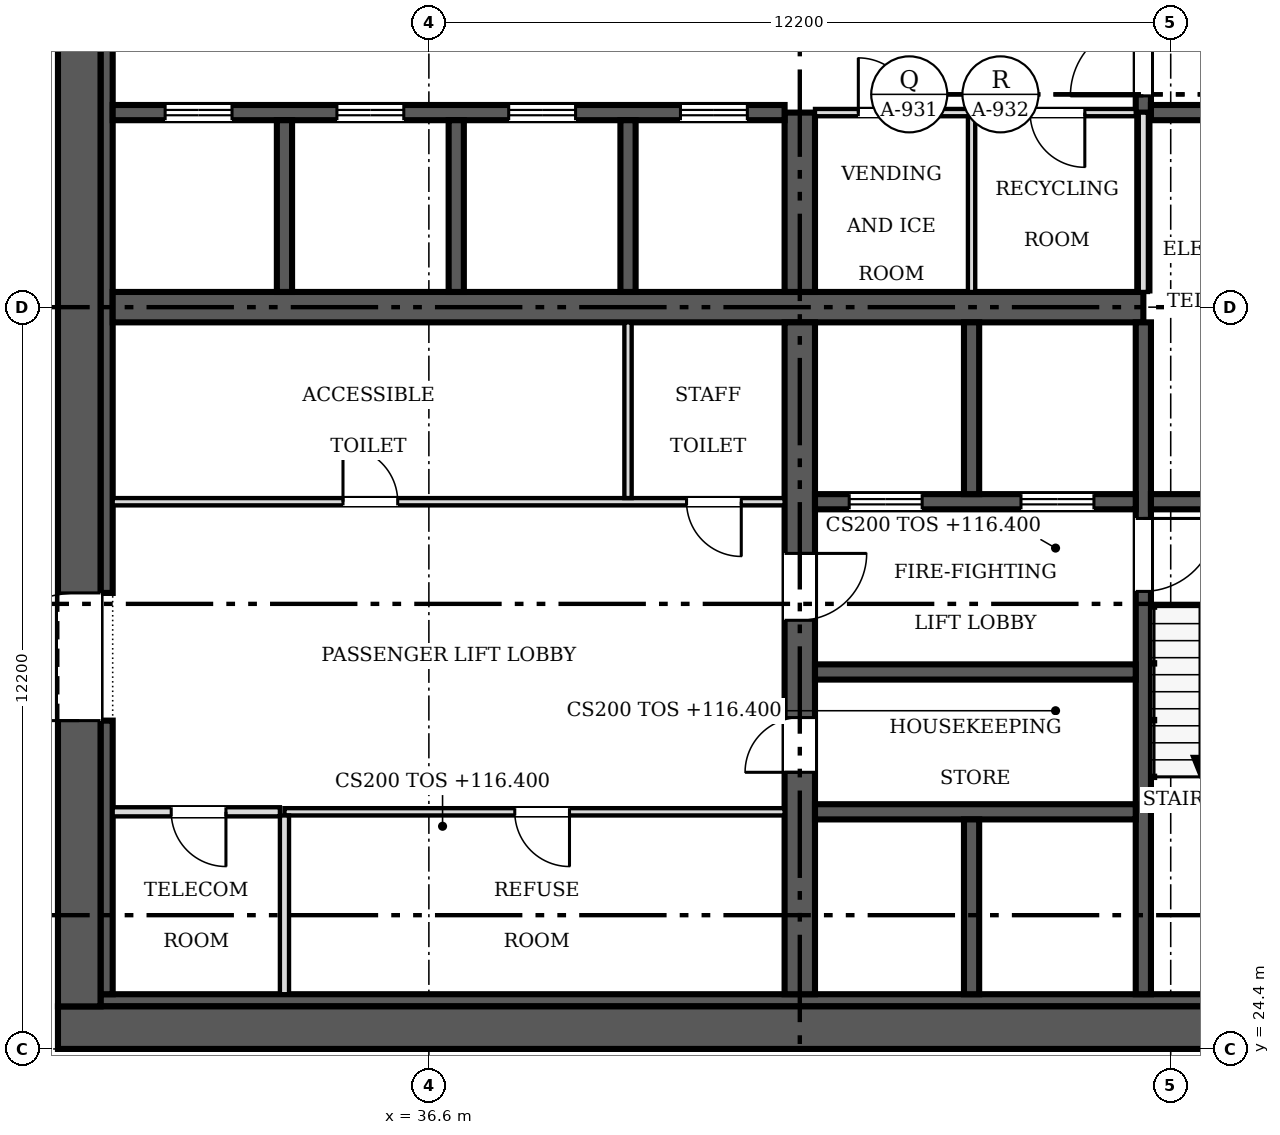
"""IFC4 building model, lengths in metres.
Left out: names, types, materials, properties, quantities, classifications, styles, units other than length and angle.
Written with IfcOpenShell. Run it as: python <this file> out.ifc"""

import sys

from ifc_helpers import new_model, si_unit, direction, frame, frame_2d, origin, place, context, subcontext, project, spatial, rectangle, extrude, source, transform, mapped, element, fill, save


model = new_model("IFC4")
c1 = context("Model", 3, precision=1e-05, world=origin(), true_north=direction((0.0, 1.0)))
c2 = subcontext(c1, "Body", "Model", "MODEL_VIEW")
j1 = project(units=[si_unit("LENGTHUNIT", "METRE"), si_unit("PLANEANGLEUNIT", "RADIAN")], contexts=[c1])
p1 = place(None, origin())
s1 = spatial("IfcSite", under=j1, at=p1, CompositionType="ELEMENT")
p2 = place(p1, origin())
s2 = spatial("IfcBuilding", under=s1, at=p2, CompositionType="ELEMENT")
p3 = place(p2, frame((0.0, 0.0, 116.4)))
s3 = spatial("IfcBuildingStorey", under=s2, at=p3, CompositionType="ELEMENT", Elevation=116.4)
p4 = place(p3, frame((54.9, 24.75, 0.0), z_axis=(0.0, 0.0, 1.0), x_axis=(-1.0, 0.0, 0.0)))
e1 = element("IfcWall", 1, at=p4, inside=s3, PredefinedType="SHEAR", context=c2, shape_type="SweptSolid", body=[
    extrude(rectangle(XDim=24.4, YDim=0.7, at=frame_2d((12.2, 0.0))), origin(), (0.0, 0.0, 1.0), 3.8),
])
m1 = source(origin(), c2, "Body", "SweptSolid", [
    extrude(rectangle(XDim=1.2, YDim=2.1, at=frame_2d((0.6, 1.05))), frame((0.0, 0.36, 0.0), z_axis=(0.0, -1.0, 0.0), x_axis=(1.0, 0.0, 0.0)), (0.0, 0.0, 1.0), 0.72),
])
p5 = place(p4, frame((1.5, 0.0, 0.0)))
e2 = element("IfcOpeningElement", 2, at=p5, cuts=e1, PredefinedType="OPENING", context=c2, shape_type="MappedRepresentation", body=[
    mapped(m1, transform((0.0, 0.0, 0.0), scale=1.0)),
])
p6 = place(p3, frame((30.85, 25.1, 0.0), z_axis=(0.0, 0.0, 1.0), x_axis=(0.0, 1.0, 0.0)))
e3 = element("IfcWall", 3, at=p6, inside=s3, PredefinedType="SHEAR", context=c2, shape_type="SweptSolid", body=[
    extrude(rectangle(XDim=23.0, YDim=0.7, at=frame_2d((11.5, 0.0))), origin(), (0.0, 0.0, 1.0), 3.8),
])
m2 = source(origin(), c2, "Body", "SweptSolid", [
    extrude(rectangle(XDim=2.1, YDim=2.4, at=frame_2d((1.05, 1.2))), frame((0.0, 0.36, 0.0), z_axis=(0.0, -1.0, 0.0), x_axis=(1.0, 0.0, 0.0)), (0.0, 0.0, 1.0), 0.72),
])
p7 = place(p6, frame((4.7, 0.0, 0.0)))
e4 = element("IfcOpeningElement", 4, at=p7, cuts=e3, PredefinedType="OPENING", context=c2, shape_type="MappedRepresentation", body=[
    mapped(m2, transform((0.0, 0.0, 0.0), scale=1.0)),
])
p8 = place(p6, frame((16.2, 0.0, 0.0)))
e5 = element("IfcOpeningElement", 5, at=p8, cuts=e3, PredefinedType="OPENING", context=c2, shape_type="MappedRepresentation", body=[
    mapped(m2, transform((0.0, 0.0, 0.0), scale=1.0)),
])
p9 = place(p3, frame((31.2, 25.2, 0.0), z_axis=(0.0, 0.0, 1.0), x_axis=(1.0, 0.0, 0.0)))
e6 = element("IfcWall", 6, at=p9, inside=s3, PredefinedType="SOLIDWALL", context=c2, shape_type="SweptSolid", body=[
    extrude(rectangle(XDim=21.0, YDim=0.2, at=frame_2d((10.5, 0.0))), origin(), (0.0, 0.0, 1.0), 3.8),
])
p10 = place(p3, frame((31.3, 25.3, 0.0), z_axis=(0.0, 0.0, 1.0), x_axis=(0.0, 1.0, 0.0)))
e7 = element("IfcWall", 7, at=p10, inside=s3, PredefinedType="SOLIDWALL", context=c2, shape_type="SweptSolid", body=[
    extrude(rectangle(XDim=4.5, YDim=0.2, at=frame_2d((2.25, 0.0))), origin(), (0.0, 0.0, 1.0), 3.8),
])
p11 = place(p3, frame((31.3, 31.9, 0.0), z_axis=(0.0, 0.0, 1.0), x_axis=(0.0, 1.0, 0.0)))
e8 = element("IfcWall", 8, at=p11, inside=s3, PredefinedType="SOLIDWALL", context=c2, shape_type="SweptSolid", body=[
    extrude(rectangle(XDim=9.4, YDim=0.2, at=frame_2d((4.7, 0.0))), origin(), (0.0, 0.0, 1.0), 3.8),
])
p12 = place(p3, frame((31.4, 36.6, 0.0), z_axis=(0.0, 0.0, 1.0), x_axis=(1.0, 0.0, 0.0)))
e9 = element("IfcWall", 9, at=p12, inside=s3, PredefinedType="SHEAR", context=c2, shape_type="SweptSolid", body=[
    extrude(rectangle(XDim=16.95, YDim=0.5, at=frame_2d((8.475, 0.0))), origin(), (0.0, 0.0, 1.0), 3.8),
])
p13 = place(p3, frame((42.7, 36.35, 0.0), z_axis=(0.0, 0.0, 1.0), x_axis=(0.0, -1.0, 0.0)))
e10 = element("IfcWall", 10, at=p13, inside=s3, PredefinedType="SHEAR", context=c2, shape_type="SweptSolid", body=[
    extrude(rectangle(XDim=11.05, YDim=0.5, at=frame_2d((5.525, 0.0))), origin(), (0.0, 0.0, 1.0), 3.8),
])
m3 = source(origin(), c2, "Body", "SweptSolid", [
    extrude(rectangle(XDim=0.9, YDim=2.1, at=frame_2d((0.45, 1.05))), frame((0.0, 0.26, 0.0), z_axis=(0.0, -1.0, 0.0), x_axis=(1.0, 0.0, 0.0)), (0.0, 0.0, 1.0), 0.52),
])
p14 = place(p13, frame((6.5, 0.0, 0.0)))
e11 = element("IfcOpeningElement", 11, at=p14, cuts=e10, PredefinedType="OPENING", context=c2, shape_type="MappedRepresentation", body=[
    mapped(m3, transform((0.0, 0.0, 0.0), scale=1.0)),
])
m4 = source(origin(), c2, "Body", "SweptSolid", [
    extrude(rectangle(XDim=1.1, YDim=2.1, at=frame_2d((0.55, 1.05))), frame((0.0, 0.26, 0.0), z_axis=(0.0, -1.0, 0.0), x_axis=(1.0, 0.0, 0.0)), (0.0, 0.0, 1.0), 0.52),
])
p15 = place(p13, frame((3.8, 0.0, 0.0)))
e12 = element("IfcOpeningElement", 12, at=p15, cuts=e10, PredefinedType="OPENING", context=c2, shape_type="MappedRepresentation", body=[
    mapped(m4, transform((0.0, 0.0, 0.0), scale=1.0)),
])
p16 = place(p3, frame((42.7, 36.85, 0.0), z_axis=(0.0, 0.0, 1.0), x_axis=(0.0, 1.0, 0.0)))
e13 = element("IfcWall", 13, at=p16, inside=s3, PredefinedType="SHEAR", context=c2, shape_type="SweptSolid", body=[
    extrude(rectangle(XDim=2.95, YDim=0.5, at=frame_2d((1.475, 0.0))), origin(), (0.0, 0.0, 1.0), 3.8),
])
p17 = place(p3, frame((31.4, 39.8, 0.0), z_axis=(0.0, 0.0, 1.0), x_axis=(1.0, 0.0, 0.0)))
e14 = element("IfcWall", 14, at=p17, inside=s3, PredefinedType="SOLIDWALL", context=c2, shape_type="SweptSolid", body=[
    extrude(rectangle(XDim=11.05, YDim=0.25, at=frame_2d((5.525, 0.0))), origin(), (0.0, 0.0, 1.0), 3.8),
])
m5 = source(origin(), c2, "Body", "SweptSolid", [
    extrude(rectangle(XDim=1.1, YDim=2.1, at=frame_2d((0.55, 1.05))), frame((0.0, 0.135, 0.0), z_axis=(0.0, -1.0, 0.0), x_axis=(1.0, 0.0, 0.0)), (0.0, 0.0, 1.0), 0.27),
])
p18 = place(p17, frame((0.863, 0.0, 0.0)))
e15 = element("IfcOpeningElement", 15, at=p18, cuts=e14, PredefinedType="OPENING", context=c2, shape_type="MappedRepresentation", body=[
    mapped(m5, transform((0.0, 0.0, 0.0), scale=1.0)),
])
p19 = place(p17, frame((3.688, 0.0, 0.0)))
e16 = element("IfcOpeningElement", 16, at=p19, cuts=e14, PredefinedType="OPENING", context=c2, shape_type="MappedRepresentation", body=[
    mapped(m5, transform((0.0, 0.0, 0.0), scale=1.0)),
])
p20 = place(p17, frame((6.512, 0.0, 0.0)))
e17 = element("IfcOpeningElement", 17, at=p20, cuts=e14, PredefinedType="OPENING", context=c2, shape_type="MappedRepresentation", body=[
    mapped(m5, transform((0.0, 0.0, 0.0), scale=1.0)),
])
p21 = place(p17, frame((9.337, 0.0, 0.0)))
e18 = element("IfcOpeningElement", 18, at=p21, cuts=e14, PredefinedType="OPENING", context=c2, shape_type="MappedRepresentation", body=[
    mapped(m5, transform((0.0, 0.0, 0.0), scale=1.0)),
])
p22 = place(p3, frame((48.35, 36.35, 0.0), z_axis=(0.0, 0.0, 1.0), x_axis=(0.0, -1.0, 0.0)))
e19 = element("IfcWall", 19, at=p22, inside=s3, PredefinedType="SOLIDWALL", context=c2, shape_type="SweptSolid", body=[
    extrude(rectangle(XDim=11.05, YDim=0.25, at=frame_2d((5.525, 0.0))), origin(), (0.0, 0.0, 1.0), 3.8),
])
m6 = source(origin(), c2, "Body", "SweptSolid", [
    extrude(rectangle(XDim=1.2, YDim=2.1, at=frame_2d((0.6, 1.05))), frame((0.0, 0.135, 0.0), z_axis=(0.0, -1.0, 0.0), x_axis=(1.0, 0.0, 0.0)), (0.0, 0.0, 1.0), 0.27),
])
p23 = place(p22, frame((3.225, 0.0, 0.0)))
e20 = element("IfcOpeningElement", 20, at=p23, cuts=e19, PredefinedType="OPENING", context=c2, shape_type="MappedRepresentation", body=[
    mapped(m6, transform((0.0, 0.0, 0.0), scale=1.0)),
])
p24 = place(p3, frame((48.225, 33.4, 0.0), z_axis=(0.0, 0.0, 1.0), x_axis=(-1.0, 0.0, 0.0)))
e21 = element("IfcWall", 21, at=p24, inside=s3, PredefinedType="SOLIDWALL", context=c2, shape_type="SweptSolid", body=[
    extrude(rectangle(XDim=5.275, YDim=0.25, at=frame_2d((2.638, 0.0))), origin(), (0.0, 0.0, 1.0), 3.8),
])
p25 = place(p24, frame((3.512, 0.0, 0.0)))
e22 = element("IfcOpeningElement", 22, at=p25, cuts=e21, PredefinedType="OPENING", context=c2, shape_type="MappedRepresentation", body=[
    mapped(m6, transform((0.0, 0.0, 0.0), scale=1.0)),
])
p26 = place(p24, frame((0.688, 0.0, 0.0)))
e23 = element("IfcOpeningElement", 23, at=p26, cuts=e21, PredefinedType="OPENING", context=c2, shape_type="MappedRepresentation", body=[
    mapped(m6, transform((0.0, 0.0, 0.0), scale=1.0)),
])
p27 = place(p3, frame((48.475, 33.4, 0.0), z_axis=(0.0, 0.0, 1.0), x_axis=(1.0, 0.0, 0.0)))
e24 = element("IfcWall", 24, at=p27, inside=s3, PredefinedType="SOLIDWALL", context=c2, shape_type="SweptSolid", body=[
    extrude(rectangle(XDim=3.525, YDim=0.25, at=frame_2d((1.762, 0.0))), origin(), (0.0, 0.0, 1.0), 3.8),
])
p28 = place(p3, frame((48.35, 47.9, 0.0), z_axis=(0.0, 0.0, 1.0), x_axis=(0.0, -1.0, 0.0)))
e25 = element("IfcWall", 25, at=p28, inside=s3, PredefinedType="SOLIDWALL", context=c2, shape_type="SweptSolid", body=[
    extrude(rectangle(XDim=8.1, YDim=0.25, at=frame_2d((4.05, 0.0))), origin(), (0.0, 0.0, 1.0), 3.8),
])
p29 = place(p28, frame((6.625, 0.0, 0.0)))
e26 = element("IfcOpeningElement", 26, at=p29, cuts=e25, PredefinedType="OPENING", context=c2, shape_type="MappedRepresentation", body=[
    mapped(m6, transform((0.0, 0.0, 0.0), scale=1.0)),
])
for number, where, z_axis, x_axis in (
    (27, (42.95, 28.3, 0.0), (0.0, 0.0, 1.0), (1.0, 0.0, 0.0)),
    (28, (42.95, 30.6, 0.0), (0.0, 0.0, 1.0), (1.0, 0.0, 0.0)),
):
    element("IfcWall", number, at=place(p3, frame(where, z_axis=z_axis, x_axis=x_axis)), inside=s3, PredefinedType="SOLIDWALL", context=c2, shape_type="SweptSolid", body=[
        extrude(rectangle(XDim=5.275, YDim=0.25, at=frame_2d((2.638, 0.0))), origin(), (0.0, 0.0, 1.0), 3.8),
    ])
p30 = place(p3, frame((48.475, 39.8, 0.0), z_axis=(0.0, 0.0, 1.0), x_axis=(1.0, 0.0, 0.0)))
e29 = element("IfcWall", 29, at=p30, inside=s3, PredefinedType="SOLIDWALL", context=c2, shape_type="SweptSolid", body=[
    extrude(rectangle(XDim=3.4, YDim=0.25, at=frame_2d((1.7, 0.0))), origin(), (0.0, 0.0, 1.0), 3.8),
])
for number, where, z_axis, x_axis in (
    (30, (34.225, 36.85, 0.0), (0.0, 0.0, 1.0), (0.0, 1.0, 0.0)),
    (31, (37.05, 36.85, 0.0), (0.0, 0.0, 1.0), (0.0, 1.0, 0.0)),
    (32, (39.875, 36.85, 0.0), (0.0, 0.0, 1.0), (0.0, 1.0, 0.0)),
):
    element("IfcWall", number, at=place(p3, frame(where, z_axis=z_axis, x_axis=x_axis)), inside=s3, PredefinedType="SOLIDWALL", context=c2, shape_type="SweptSolid", body=[
        extrude(rectangle(XDim=2.825, YDim=0.25, at=frame_2d((1.413, 0.0))), origin(), (0.0, 0.0, 1.0), 3.8),
    ])
p31 = place(p3, frame((45.525, 33.525, 0.0), z_axis=(0.0, 0.0, 1.0), x_axis=(0.0, 1.0, 0.0)))
e33 = element("IfcWall", 33, at=p31, inside=s3, PredefinedType="SOLIDWALL", context=c2, shape_type="SweptSolid", body=[
    extrude(rectangle(XDim=2.825, YDim=0.25, at=frame_2d((1.413, 0.0))), origin(), (0.0, 0.0, 1.0), 3.8),
])
p32 = place(p3, frame((45.525, 25.3, 0.0), z_axis=(0.0, 0.0, 1.0), x_axis=(0.0, 1.0, 0.0)))
e34 = element("IfcWall", 34, at=p32, inside=s3, PredefinedType="SOLIDWALL", context=c2, shape_type="SweptSolid", body=[
    extrude(rectangle(XDim=2.875, YDim=0.25, at=frame_2d((1.438, 0.0))), origin(), (0.0, 0.0, 1.0), 3.8),
])
p33 = place(p3, frame((31.4, 33.4, 0.0), z_axis=(0.0, 0.0, 1.0), x_axis=(1.0, 0.0, 0.0)))
e35 = element("IfcWall", 35, at=p33, inside=s3, PredefinedType="PARTITIONING", context=c2, shape_type="SweptSolid", body=[
    extrude(rectangle(XDim=11.05, YDim=0.12, at=frame_2d((5.525, 0.0))), origin(), (0.0, 0.0, 1.0), 3.6),
])
m7 = source(origin(), c2, "Body", "SweptSolid", [
    extrude(rectangle(XDim=0.9, YDim=2.1, at=frame_2d((0.45, 1.05))), frame((0.0, 0.07, 0.0), z_axis=(0.0, -1.0, 0.0), x_axis=(1.0, 0.0, 0.0)), (0.0, 0.0, 1.0), 0.14),
])
p34 = place(p33, frame((3.788, 0.0, 0.0)))
e36 = element("IfcOpeningElement", 36, at=p34, cuts=e35, PredefinedType="OPENING", context=c2, shape_type="MappedRepresentation", body=[
    mapped(m7, transform((0.0, 0.0, 0.0), scale=1.0)),
])
p35 = place(p33, frame((9.438, 0.0, 0.0)))
e37 = element("IfcOpeningElement", 37, at=p35, cuts=e35, PredefinedType="OPENING", context=c2, shape_type="MappedRepresentation", body=[
    mapped(m7, transform((0.0, 0.0, 0.0), scale=1.0)),
])
p36 = place(p3, frame((42.45, 28.3, 0.0), z_axis=(0.0, 0.0, 1.0), x_axis=(-1.0, 0.0, 0.0)))
e38 = element("IfcWall", 38, at=p36, inside=s3, PredefinedType="PARTITIONING", context=c2, shape_type="SweptSolid", body=[
    extrude(rectangle(XDim=8.225, YDim=0.12, at=frame_2d((4.112, 0.0))), origin(), (0.0, 0.0, 1.0), 3.6),
])
p37 = place(p36, frame((3.538, 0.0, 0.0)))
e39 = element("IfcOpeningElement", 39, at=p37, cuts=e38, PredefinedType="OPENING", context=c2, shape_type="MappedRepresentation", body=[
    mapped(m7, transform((0.0, 0.0, 0.0), scale=1.0)),
])
p38 = place(p3, frame((48.225, 39.8, 0.0), z_axis=(0.0, 0.0, 1.0), x_axis=(-1.0, 0.0, 0.0)))
e40 = element("IfcWall", 40, at=p38, inside=s3, PredefinedType="PARTITIONING", context=c2, shape_type="SweptSolid", body=[
    extrude(rectangle(XDim=5.275, YDim=0.12, at=frame_2d((2.638, 0.0))), origin(), (0.0, 0.0, 1.0), 3.6),
])
p39 = place(p38, frame((3.663, 0.0, 0.0)))
e41 = element("IfcOpeningElement", 41, at=p39, cuts=e40, PredefinedType="OPENING", context=c2, shape_type="MappedRepresentation", body=[
    mapped(m7, transform((0.0, 0.0, 0.0), scale=1.0)),
])
p40 = place(p38, frame((0.837, 0.0, 0.0)))
e42 = element("IfcOpeningElement", 42, at=p40, cuts=e40, PredefinedType="OPENING", context=c2, shape_type="MappedRepresentation", body=[
    mapped(m7, transform((0.0, 0.0, 0.0), scale=1.0)),
])
p41 = place(p3, frame((45.525, 36.85, 0.0), z_axis=(0.0, 0.0, 1.0), x_axis=(0.0, 1.0, 0.0)))
e43 = element("IfcWall", 43, at=p41, inside=s3, PredefinedType="PARTITIONING", context=c2, shape_type="SweptSolid", body=[
    extrude(rectangle(XDim=2.89, YDim=0.12, at=frame_2d((1.445, 0.0))), origin(), (0.0, 0.0, 1.0), 3.6),
])
p42 = place(p3, frame((48.35, 36.85, 0.0), z_axis=(0.0, 0.0, 1.0), x_axis=(0.0, 1.0, 0.0)))
e44 = element("IfcWall", 44, at=p42, inside=s3, PredefinedType="PARTITIONING", context=c2, shape_type="SweptSolid", body=[
    extrude(rectangle(XDim=2.95, YDim=0.15, at=frame_2d((1.475, 0.0))), origin(), (0.0, 0.0, 1.0), 3.6),
])
p43 = place(p3, frame((39.875, 33.46, 0.0), z_axis=(0.0, 0.0, 1.0), x_axis=(0.0, 1.0, 0.0)))
e45 = element("IfcWall", 45, at=p43, inside=s3, PredefinedType="PARTITIONING", context=c2, shape_type="SweptSolid", body=[
    extrude(rectangle(XDim=2.89, YDim=0.12, at=frame_2d((1.445, 0.0))), origin(), (0.0, 0.0, 1.0), 3.6),
])
p44 = place(p3, frame((34.225, 25.3, 0.0), z_axis=(0.0, 0.0, 1.0), x_axis=(0.0, 1.0, 0.0)))
e46 = element("IfcWall", 46, at=p44, inside=s3, PredefinedType="PARTITIONING", context=c2, shape_type="SweptSolid", body=[
    extrude(rectangle(XDim=2.94, YDim=0.15, at=frame_2d((1.47, 0.0))), origin(), (0.0, 0.0, 1.0), 3.6),
])
p45 = place(p3, frame((34.15, 28.3, 0.0), z_axis=(0.0, 0.0, 1.0), x_axis=(-1.0, 0.0, 0.0)))
e47 = element("IfcWall", 47, at=p45, inside=s3, PredefinedType="PARTITIONING", context=c2, shape_type="SweptSolid", body=[
    extrude(rectangle(XDim=2.75, YDim=0.15, at=frame_2d((1.375, 0.0))), origin(), (0.0, 0.0, 1.0), 3.6),
])
m8 = source(origin(), c2, "Body", "SweptSolid", [
    extrude(rectangle(XDim=0.9, YDim=2.1, at=frame_2d((0.45, 1.05))), frame((0.0, 0.085, 0.0), z_axis=(0.0, -1.0, 0.0), x_axis=(1.0, 0.0, 0.0)), (0.0, 0.0, 1.0), 0.17),
])
p46 = place(p45, frame((0.887, 0.0, 0.0)))
e48 = element("IfcOpeningElement", 48, at=p46, cuts=e47, PredefinedType="OPENING", context=c2, shape_type="MappedRepresentation", body=[
    mapped(m8, transform((0.0, 0.0, 0.0), scale=1.0)),
])
m9 = source(origin(), c2, "Body", "SweptSolid", [
    extrude(rectangle(XDim=2.1, YDim=2.4, at=frame_2d((1.05, 1.2))), frame((0.0, 0.025, 0.0), z_axis=(0.0, -1.0, 0.0), x_axis=(1.0, 0.0, 0.0)), (0.0, 0.0, 1.0), 0.05),
])
p47 = place(p7, origin())
e49 = element("IfcDoor", 49, at=p47, inside=s3, OperationType="DOUBLE_DOOR_SINGLE_SWING", PredefinedType="DOOR", context=c2, shape_type="MappedRepresentation", body=[
    mapped(m9, transform((0.0, 0.0, 0.0), scale=1.0)),
])
fill(e4, e49)
m10 = source(origin(), c2, "Body", "SweptSolid", [
    extrude(rectangle(XDim=0.9, YDim=2.1, at=frame_2d((0.45, 1.05))), frame((0.0, 0.025, 0.0), z_axis=(0.0, -1.0, 0.0), x_axis=(1.0, 0.0, 0.0)), (0.0, 0.0, 1.0), 0.05),
])
p48 = place(p14, origin())
e50 = element("IfcDoor", 50, at=p48, inside=s3, OperationType="SINGLE_SWING_RIGHT", PredefinedType="DOOR", context=c2, shape_type="MappedRepresentation", body=[
    mapped(m10, transform((0.0, 0.0, 0.0), scale=1.0)),
])
fill(e11, e50)
m11 = source(origin(), c2, "Body", "SweptSolid", [
    extrude(rectangle(XDim=1.1, YDim=2.1, at=frame_2d((0.55, 1.05))), frame((0.0, 0.025, 0.0), z_axis=(0.0, -1.0, 0.0), x_axis=(1.0, 0.0, 0.0)), (0.0, 0.0, 1.0), 0.05),
])
p49 = place(p15, origin())
e51 = element("IfcDoor", 51, at=p49, inside=s3, OperationType="SINGLE_SWING_LEFT", PredefinedType="DOOR", context=c2, shape_type="MappedRepresentation", body=[
    mapped(m11, transform((0.0, 0.0, 0.0), scale=1.0)),
])
fill(e12, e51)
p50 = place(p18, origin())
e52 = element("IfcDoor", 52, at=p50, inside=s3, OperationType="DOUBLE_DOOR_SLIDING", PredefinedType="DOOR", context=c2, shape_type="MappedRepresentation", body=[
    mapped(m11, transform((0.0, 0.0, 0.0), scale=1.0)),
])
fill(e15, e52)
p51 = place(p19, origin())
e53 = element("IfcDoor", 53, at=p51, inside=s3, OperationType="DOUBLE_DOOR_SLIDING", PredefinedType="DOOR", context=c2, shape_type="MappedRepresentation", body=[
    mapped(m11, transform((0.0, 0.0, 0.0), scale=1.0)),
])
fill(e16, e53)
p52 = place(p20, origin())
e54 = element("IfcDoor", 54, at=p52, inside=s3, OperationType="DOUBLE_DOOR_SLIDING", PredefinedType="DOOR", context=c2, shape_type="MappedRepresentation", body=[
    mapped(m11, transform((0.0, 0.0, 0.0), scale=1.0)),
])
fill(e17, e54)
p53 = place(p21, origin())
e55 = element("IfcDoor", 55, at=p53, inside=s3, OperationType="DOUBLE_DOOR_SLIDING", PredefinedType="DOOR", context=c2, shape_type="MappedRepresentation", body=[
    mapped(m11, transform((0.0, 0.0, 0.0), scale=1.0)),
])
fill(e18, e55)
m12 = source(origin(), c2, "Body", "SweptSolid", [
    extrude(rectangle(XDim=1.2, YDim=2.1, at=frame_2d((0.6, 1.05))), frame((0.0, 0.025, 0.0), z_axis=(0.0, -1.0, 0.0), x_axis=(1.0, 0.0, 0.0)), (0.0, 0.0, 1.0), 0.05),
])
p54 = place(p23, origin())
e56 = element("IfcDoor", 56, at=p54, inside=s3, OperationType="SINGLE_SWING_LEFT", PredefinedType="DOOR", context=c2, shape_type="MappedRepresentation", body=[
    mapped(m12, transform((0.0, 0.0, 0.0), scale=1.0)),
])
fill(e20, e56)
p55 = place(p25, origin())
e57 = element("IfcDoor", 57, at=p55, inside=s3, OperationType="DOUBLE_DOOR_SLIDING", PredefinedType="DOOR", context=c2, shape_type="MappedRepresentation", body=[
    mapped(m12, transform((0.0, 0.0, 0.0), scale=1.0)),
])
fill(e22, e57)
p56 = place(p26, origin())
e58 = element("IfcDoor", 58, at=p56, inside=s3, OperationType="DOUBLE_DOOR_SLIDING", PredefinedType="DOOR", context=c2, shape_type="MappedRepresentation", body=[
    mapped(m12, transform((0.0, 0.0, 0.0), scale=1.0)),
])
fill(e23, e58)
p57 = place(p29, origin())
e59 = element("IfcDoor", 59, at=p57, inside=s3, OperationType="SINGLE_SWING_RIGHT", PredefinedType="DOOR", context=c2, shape_type="MappedRepresentation", body=[
    mapped(m12, transform((0.0, 0.0, 0.0), scale=1.0)),
])
fill(e26, e59)
p58 = place(p34, origin())
e60 = element("IfcDoor", 60, at=p58, inside=s3, OperationType="SINGLE_SWING_LEFT", PredefinedType="DOOR", context=c2, shape_type="MappedRepresentation", body=[
    mapped(m10, transform((0.0, 0.0, 0.0), scale=1.0)),
])
fill(e36, e60)
p59 = place(p35, origin())
e61 = element("IfcDoor", 61, at=p59, inside=s3, OperationType="SINGLE_SWING_RIGHT", PredefinedType="DOOR", context=c2, shape_type="MappedRepresentation", body=[
    mapped(m10, transform((0.0, 0.0, 0.0), scale=1.0)),
])
fill(e37, e61)
p60 = place(p37, origin())
e62 = element("IfcDoor", 62, at=p60, inside=s3, OperationType="SINGLE_SWING_LEFT", PredefinedType="DOOR", context=c2, shape_type="MappedRepresentation", body=[
    mapped(m10, transform((0.0, 0.0, 0.0), scale=1.0)),
])
fill(e39, e62)
p61 = place(p39, origin())
e63 = element("IfcDoor", 63, at=p61, inside=s3, OperationType="SINGLE_SWING_RIGHT", PredefinedType="DOOR", context=c2, shape_type="MappedRepresentation", body=[
    mapped(m10, transform((0.0, 0.0, 0.0), scale=1.0)),
])
fill(e41, e63)
p62 = place(p40, origin())
e64 = element("IfcDoor", 64, at=p62, inside=s3, OperationType="SINGLE_SWING_LEFT", PredefinedType="DOOR", context=c2, shape_type="MappedRepresentation", body=[
    mapped(m10, transform((0.0, 0.0, 0.0), scale=1.0)),
])
fill(e42, e64)
p63 = place(p46, origin())
e65 = element("IfcDoor", 65, at=p63, inside=s3, OperationType="SINGLE_SWING_LEFT", PredefinedType="DOOR", context=c2, shape_type="MappedRepresentation", body=[
    mapped(m10, transform((0.0, 0.0, 0.0), scale=1.0)),
])
fill(e48, e65)
save(model, sys.argv[1])
